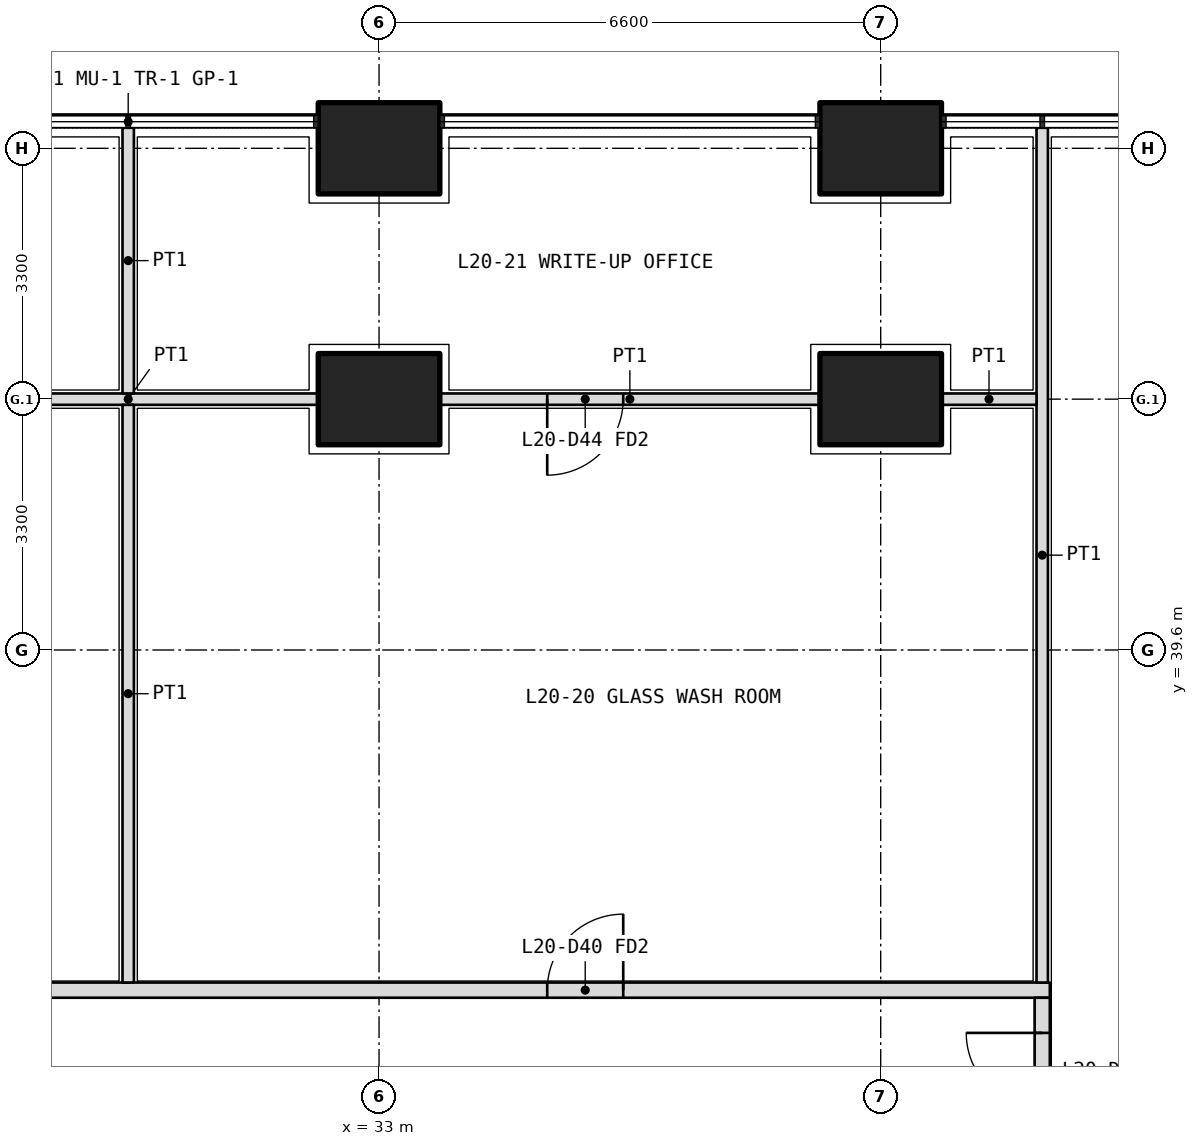
"""IFC4 building model, lengths in metres.
Left out: names, types, materials, properties, quantities, classifications, styles, units other than length and angle.
Written with IfcOpenShell. Run it as: python <this file> out.ifc"""

import sys

from ifc_helpers import new_model, si_unit, direction, frame, frame_2d, origin, origin_2d, place, context, subcontext, project, spatial, rectangle, extrude, element, fill, save


model = new_model("IFC4")
c1 = context("Model", 3, precision=1e-05, world=origin(), true_north=direction((0.0, 1.0)))
c2 = subcontext(c1, "Body", "Model", "MODEL_VIEW")
j1 = project(units=[si_unit("LENGTHUNIT", "METRE"), si_unit("PLANEANGLEUNIT", "RADIAN")], contexts=[c1])
p1 = place(None, origin())
s1 = spatial("IfcSite", under=j1, at=p1, CompositionType="ELEMENT")
p2 = place(p1, origin())
s2 = spatial("IfcBuilding", under=s1, at=p2, CompositionType="ELEMENT")
p3 = place(p2, frame((0.0, 0.0, 90.6)))
s3 = spatial("IfcBuildingStorey", under=s2, at=p3, CompositionType="ELEMENT", Elevation=90.6)
for number, where, z_axis, x_axis in (
    (1, (33.0, 46.2, 0.0), (0.0, 0.0, 1.0), (1.0, 0.0, 0.0)),
    (2, (39.6, 46.2, 0.0), (0.0, 0.0, 1.0), (1.0, 0.0, 0.0)),
    (3, (33.0, 42.9, 0.0), (0.0, 0.0, 1.0), (1.0, 0.0, 0.0)),
    (4, (39.6, 42.9, 0.0), (0.0, 0.0, 1.0), (1.0, 0.0, 0.0)),
):
    element("IfcColumn", number, at=place(p3, frame(where, z_axis=z_axis, x_axis=x_axis)), inside=s3, PredefinedType="COLUMN", context=c2, shape_type="SweptSolid", body=[
        extrude(rectangle(XDim=1.6, YDim=1.2, at=origin_2d()), origin(), (0.0, 0.0, 1.0), 4.2),
    ])
p4 = place(p3, frame((10.975, 35.125, 0.0), z_axis=(0.0, 0.0, 1.0), x_axis=(1.0, 0.0, 0.0)))
e5 = element("IfcWall", 5, at=p4, inside=s3, PredefinedType="PARTITIONING", context=c2, shape_type="SweptSolid", body=[
    extrude(rectangle(XDim=30.85, YDim=0.2, at=frame_2d((15.425, 0.0))), origin(), (0.0, 0.0, 1.0), 2.85),
])
p5 = place(p4, frame((3.962, 0.0, 0.0)))
e6 = element("IfcOpeningElement", 6, at=p5, cuts=e5, PredefinedType="OPENING", context=c2, shape_type="SweptSolid", body=[
    extrude(rectangle(XDim=1.0, YDim=2.1, at=frame_2d((0.5, 1.05))), frame((0.0, 0.11, 0.0), z_axis=(0.0, -1.0, 0.0), x_axis=(1.0, 0.0, 0.0)), (0.0, 0.0, 1.0), 0.22),
])
p6 = place(p4, frame((9.975, 0.0, 0.0)))
e7 = element("IfcOpeningElement", 7, at=p6, cuts=e5, PredefinedType="OPENING", context=c2, shape_type="SweptSolid", body=[
    extrude(rectangle(XDim=1.0, YDim=2.1, at=frame_2d((0.5, 1.05))), frame((0.0, 0.11, 0.0), z_axis=(0.0, -1.0, 0.0), x_axis=(1.0, 0.0, 0.0)), (0.0, 0.0, 1.0), 0.22),
])
p7 = place(p4, frame((14.825, 0.0, 0.0)))
e8 = element("IfcOpeningElement", 8, at=p7, cuts=e5, PredefinedType="OPENING", context=c2, shape_type="SweptSolid", body=[
    extrude(rectangle(XDim=1.2, YDim=2.1, at=frame_2d((0.6, 1.05))), frame((0.0, 0.11, 0.0), z_axis=(0.0, -1.0, 0.0), x_axis=(1.0, 0.0, 0.0)), (0.0, 0.0, 1.0), 0.22),
])
p8 = place(p4, frame((24.238, 0.0, 0.0)))
e9 = element("IfcOpeningElement", 9, at=p8, cuts=e5, PredefinedType="OPENING", context=c2, shape_type="SweptSolid", body=[
    extrude(rectangle(XDim=1.0, YDim=2.1, at=frame_2d((0.5, 1.05))), frame((0.0, 0.11, 0.0), z_axis=(0.0, -1.0, 0.0), x_axis=(1.0, 0.0, 0.0)), (0.0, 0.0, 1.0), 0.22),
])
p9 = place(p3, frame((41.725, 7.4, 0.0), z_axis=(0.0, 0.0, 1.0), x_axis=(0.0, 1.0, 0.0)))
e10 = element("IfcWall", 10, at=p9, inside=s3, PredefinedType="PARTITIONING", context=c2, shape_type="SweptSolid", body=[
    extrude(rectangle(XDim=27.625, YDim=0.2, at=frame_2d((13.812, 0.0))), origin(), (0.0, 0.0, 1.0), 2.85),
])
p10 = place(p9, frame((5.65, 0.0, 0.0)))
e11 = element("IfcOpeningElement", 11, at=p10, cuts=e10, PredefinedType="OPENING", context=c2, shape_type="SweptSolid", body=[
    extrude(rectangle(XDim=1.0, YDim=2.1, at=frame_2d((0.5, 1.05))), frame((0.0, 0.11, 0.0), z_axis=(0.0, -1.0, 0.0), x_axis=(1.0, 0.0, 0.0)), (0.0, 0.0, 1.0), 0.22),
])
p11 = place(p9, frame((13.4, 0.0, 0.0)))
e12 = element("IfcOpeningElement", 12, at=p11, cuts=e10, PredefinedType="OPENING", context=c2, shape_type="SweptSolid", body=[
    extrude(rectangle(XDim=1.0, YDim=2.1, at=frame_2d((0.5, 1.05))), frame((0.0, 0.11, 0.0), z_axis=(0.0, -1.0, 0.0), x_axis=(1.0, 0.0, 0.0)), (0.0, 0.0, 1.0), 0.22),
])
p12 = place(p9, frame((16.75, 0.0, 0.0)))
e13 = element("IfcOpeningElement", 13, at=p12, cuts=e10, PredefinedType="OPENING", context=c2, shape_type="SweptSolid", body=[
    extrude(rectangle(XDim=0.9, YDim=2.1, at=frame_2d((0.45, 1.05))), frame((0.0, 0.11, 0.0), z_axis=(0.0, -1.0, 0.0), x_axis=(1.0, 0.0, 0.0)), (0.0, 0.0, 1.0), 0.22),
])
p13 = place(p9, frame((21.8, 0.0, 0.0)))
e14 = element("IfcOpeningElement", 14, at=p13, cuts=e10, PredefinedType="OPENING", context=c2, shape_type="SweptSolid", body=[
    extrude(rectangle(XDim=1.0, YDim=2.1, at=frame_2d((0.5, 1.05))), frame((0.0, 0.11, 0.0), z_axis=(0.0, -1.0, 0.0), x_axis=(1.0, 0.0, 0.0)), (0.0, 0.0, 1.0), 0.22),
])
p14 = place(p9, frame((26.163, 0.0, 0.0)))
e15 = element("IfcOpeningElement", 15, at=p14, cuts=e10, PredefinedType="OPENING", context=c2, shape_type="SweptSolid", body=[
    extrude(rectangle(XDim=1.0, YDim=2.1, at=frame_2d((0.5, 1.05))), frame((0.0, 0.11, 0.0), z_axis=(0.0, -1.0, 0.0), x_axis=(1.0, 0.0, 0.0)), (0.0, 0.0, 1.0), 0.22),
])
p15 = place(p3, frame((41.725, 46.47, 0.0), z_axis=(0.0, 0.0, 1.0), x_axis=(0.0, -1.0, 0.0)))
e16 = element("IfcWall", 16, at=p15, inside=s3, PredefinedType="PARTITIONING", context=c2, shape_type="SweptSolid", body=[
    extrude(rectangle(XDim=11.245, YDim=0.15, at=frame_2d((5.623, 0.0))), origin(), (0.0, 0.0, 1.0), 2.7),
])
p16 = place(p3, frame((41.65, 42.9, 0.0), z_axis=(0.0, 0.0, 1.0), x_axis=(-1.0, 0.0, 0.0)))
e17 = element("IfcWall", 17, at=p16, inside=s3, PredefinedType="PARTITIONING", context=c2, shape_type="SweptSolid", body=[
    extrude(rectangle(XDim=1.25, YDim=0.15, at=frame_2d((0.625, 0.0))), origin(), (0.0, 0.0, 1.0), 3.9),
])
p17 = place(p3, frame((38.8, 42.9, 0.0), z_axis=(0.0, 0.0, 1.0), x_axis=(-1.0, 0.0, 0.0)))
e18 = element("IfcWall", 18, at=p17, inside=s3, PredefinedType="PARTITIONING", context=c2, shape_type="SweptSolid", body=[
    extrude(rectangle(XDim=5.0, YDim=0.15, at=frame_2d((2.5, 0.0))), origin(), (0.0, 0.0, 1.0), 3.9),
])
p18 = place(p17, frame((2.587, 0.0, 0.0)))
e19 = element("IfcOpeningElement", 19, at=p18, cuts=e18, PredefinedType="OPENING", context=c2, shape_type="SweptSolid", body=[
    extrude(rectangle(XDim=1.0, YDim=2.1, at=frame_2d((0.5, 1.05))), frame((0.0, 0.085, 0.0), z_axis=(0.0, -1.0, 0.0), x_axis=(1.0, 0.0, 0.0)), (0.0, 0.0, 1.0), 0.17),
])
p19 = place(p3, frame((32.2, 42.9, 0.0), z_axis=(0.0, 0.0, 1.0), x_axis=(-1.0, 0.0, 0.0)))
e20 = element("IfcWall", 20, at=p19, inside=s3, PredefinedType="PARTITIONING", context=c2, shape_type="SweptSolid", body=[
    extrude(rectangle(XDim=5.0, YDim=0.15, at=frame_2d((2.5, 0.0))), origin(), (0.0, 0.0, 1.0), 3.9),
])
p20 = place(p3, frame((29.7, 46.47, 0.0), z_axis=(0.0, 0.0, 1.0), x_axis=(0.0, -1.0, 0.0)))
e21 = element("IfcWall", 21, at=p20, inside=s3, PredefinedType="PARTITIONING", context=c2, shape_type="SweptSolid", body=[
    extrude(rectangle(XDim=3.495, YDim=0.15, at=frame_2d((1.748, 0.0))), origin(), (0.0, 0.0, 1.0), 2.7),
])
p21 = place(p3, frame((29.7, 42.825, 0.0), z_axis=(0.0, 0.0, 1.0), x_axis=(0.0, -1.0, 0.0)))
e22 = element("IfcWall", 22, at=p21, inside=s3, PredefinedType="PARTITIONING", context=c2, shape_type="SweptSolid", body=[
    extrude(rectangle(XDim=7.6, YDim=0.15, at=frame_2d((3.8, 0.0))), origin(), (0.0, 0.0, 1.0), 3.9),
])
p22 = place(p14, origin())
e23 = element("IfcDoor", 23, at=p22, inside=s3, OperationType="SINGLE_SWING_RIGHT", PredefinedType="DOOR", context=c2, shape_type="SweptSolid", body=[
    extrude(rectangle(XDim=1.0, YDim=2.1, at=frame_2d((0.5, 1.05))), frame((0.0, 0.025, 0.0), z_axis=(0.0, -1.0, 0.0), x_axis=(1.0, 0.0, 0.0)), (0.0, 0.0, 1.0), 0.05),
])
fill(e15, e23)
p23 = place(p8, origin())
e24 = element("IfcDoor", 24, at=p23, inside=s3, OperationType="SINGLE_SWING_RIGHT", PredefinedType="DOOR", context=c2, shape_type="SweptSolid", body=[
    extrude(rectangle(XDim=1.0, YDim=2.1, at=frame_2d((0.5, 1.05))), frame((0.0, 0.025, 0.0), z_axis=(0.0, -1.0, 0.0), x_axis=(1.0, 0.0, 0.0)), (0.0, 0.0, 1.0), 0.05),
])
fill(e9, e24)
p24 = place(p18, origin())
e25 = element("IfcDoor", 25, at=p24, inside=s3, OperationType="SINGLE_SWING_RIGHT", PredefinedType="DOOR", context=c2, shape_type="SweptSolid", body=[
    extrude(rectangle(XDim=1.0, YDim=2.1, at=frame_2d((0.5, 1.05))), frame((0.0, 0.025, 0.0), z_axis=(0.0, -1.0, 0.0), x_axis=(1.0, 0.0, 0.0)), (0.0, 0.0, 1.0), 0.05),
])
fill(e19, e25)
save(model, sys.argv[1])
